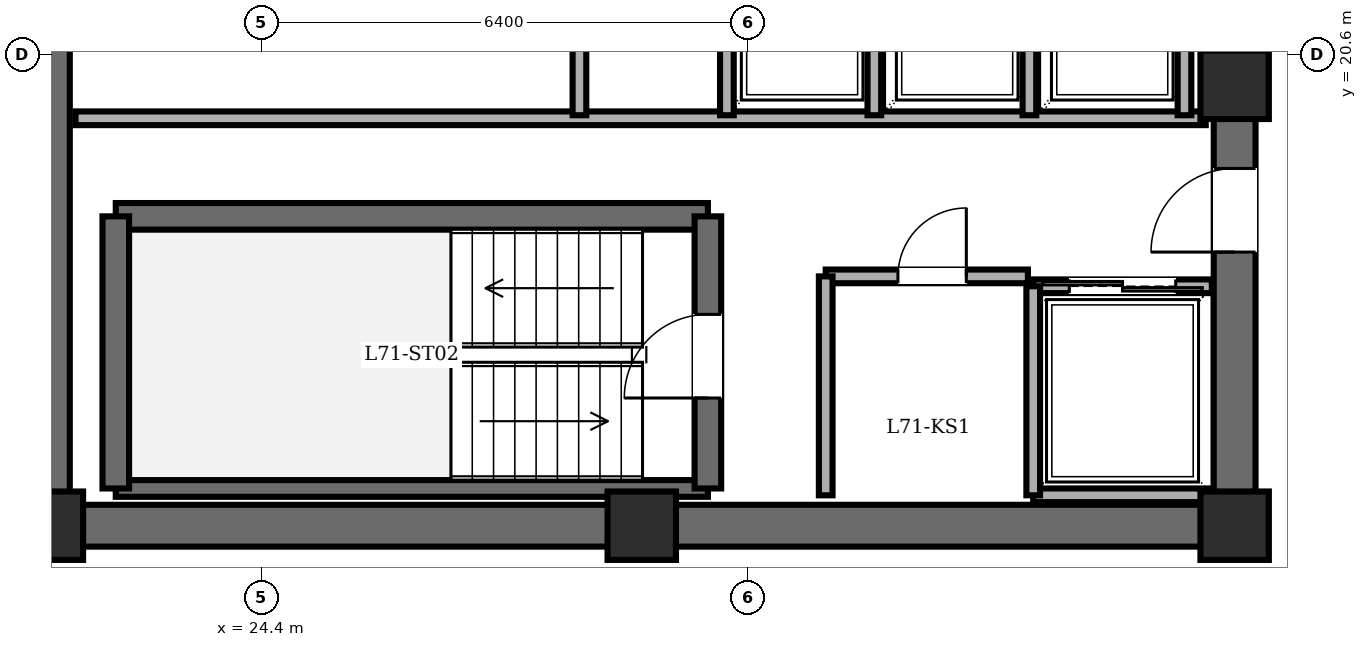
"""IFC4 building model, lengths in metres.
Left out: names, types, materials, properties, quantities, classifications, styles, units other than length and angle.
Written with IfcOpenShell. Run it as: python <this file> out.ifc"""

import sys

from ifc_helpers import new_model, si_unit, direction, frame, frame_2d, origin, origin_2d, place, context, subcontext, project, spatial, rectangle, extrude, element, fill, save


model = new_model("IFC4")
c1 = context("Model", 3, precision=1e-05, world=origin(), true_north=direction((0.0, 1.0)))
c2 = subcontext(c1, "Body", "Model", "MODEL_VIEW")
j1 = project(units=[si_unit("LENGTHUNIT", "METRE"), si_unit("PLANEANGLEUNIT", "RADIAN")], contexts=[c1])
p1 = place(None, origin())
s1 = spatial("IfcSite", under=j1, at=p1, CompositionType="ELEMENT")
p2 = place(p1, origin())
s2 = spatial("IfcBuilding", under=s1, at=p2, CompositionType="ELEMENT")
p3 = place(p2, frame((0.0, 0.0, 273.4)))
s3 = spatial("IfcBuildingStorey", under=s2, at=p3, CompositionType="ELEMENT", Elevation=273.4)
for number, where, z_axis, x_axis in (
    (1, (21.6, 14.4, 0.0), (0.0, 0.0, 1.0), (1.0, 0.0, 0.0)),
    (2, (29.4, 14.4, 0.0), (0.0, 0.0, 1.0), (1.0, 0.0, 0.0)),
    (3, (37.2, 14.4, 0.0), (0.0, 0.0, 1.0), (1.0, 0.0, 0.0)),
    (4, (37.2, 20.2, 0.0), (0.0, 0.0, 1.0), (1.0, 0.0, 0.0)),
):
    element("IfcColumn", number, at=place(p3, frame(where, z_axis=z_axis, x_axis=x_axis)), inside=s3, PredefinedType="COLUMN", context=c2, shape_type="SweptSolid", body=[
        extrude(rectangle(XDim=0.9, YDim=0.9, at=origin_2d()), origin(), (0.0, 0.0, 1.0), 3.65),
    ])
p4 = place(p3, frame((21.6, 14.4, 0.0), z_axis=(0.0, 0.0, 1.0), x_axis=(0.0, 1.0, 0.0)))
e5 = element("IfcWall", 5, at=p4, inside=s3, PredefinedType="SHEAR", context=c2, shape_type="SweptSolid", body=[
    extrude(rectangle(XDim=19.2, YDim=0.55, at=frame_2d((9.6, 0.0))), origin(), (0.0, 0.0, 1.0), 3.45),
])
p5 = place(p3, frame((37.2, 14.4, 0.0), z_axis=(0.0, 0.0, 1.0), x_axis=(-1.0, 0.0, 0.0)))
e6 = element("IfcWall", 6, at=p5, inside=s3, PredefinedType="SHEAR", context=c2, shape_type="SweptSolid", body=[
    extrude(rectangle(XDim=15.6, YDim=0.55, at=frame_2d((7.8, 0.0))), origin(), (0.0, 0.0, 1.0), 3.45),
])
p6 = place(p3, frame((37.2, 14.4, 0.0), z_axis=(0.0, 0.0, 1.0), x_axis=(0.0, 1.0, 0.0)))
e7 = element("IfcWall", 7, at=p6, inside=s3, PredefinedType="SHEAR", context=c2, shape_type="SweptSolid", body=[
    extrude(rectangle(XDim=19.2, YDim=0.55, at=frame_2d((9.6, 0.0))), origin(), (0.0, 0.0, 1.0), 3.45),
])
p7 = place(p6, frame((15.8, 0.0, 0.0)))
e8 = element("IfcOpeningElement", 8, at=p7, cuts=e7, PredefinedType="OPENING", context=c2, shape_type="SweptSolid", body=[
    extrude(rectangle(XDim=1.15, YDim=2.15, at=frame_2d((0.575, 1.075))), frame((0.0, 0.285, 0.0), z_axis=(0.0, -1.0, 0.0), x_axis=(1.0, 0.0, 0.0)), (0.0, 0.0, 1.0), 0.57),
])
p8 = place(p6, frame((3.6, 0.0, 0.0)))
e9 = element("IfcOpeningElement", 9, at=p8, cuts=e7, PredefinedType="OPENING", context=c2, shape_type="SweptSolid", body=[
    extrude(rectangle(XDim=1.1, YDim=2.15, at=frame_2d((0.55, 1.075))), frame((0.0, 0.285, 0.0), z_axis=(0.0, -1.0, 0.0), x_axis=(1.0, 0.0, 0.0)), (0.0, 0.0, 1.0), 0.57),
])
p9 = place(p6, frame((8.6, 0.0, 0.0)))
e10 = element("IfcOpeningElement", 10, at=p9, cuts=e7, PredefinedType="OPENING", context=c2, shape_type="SweptSolid", body=[
    extrude(rectangle(XDim=1.3, YDim=2.2, at=frame_2d((0.65, 1.1))), frame((0.0, 0.285, 0.0), z_axis=(0.0, -1.0, 0.0), x_axis=(1.0, 0.0, 0.0)), (0.0, 0.0, 1.0), 0.57),
])
p10 = place(p3, frame((22.48, 18.47, 0.0), z_axis=(0.0, 0.0, 1.0), x_axis=(1.0, 0.0, 0.0)))
e11 = element("IfcWall", 11, at=p10, inside=s3, PredefinedType="SOLIDWALL", context=c2, shape_type="SweptSolid", body=[
    extrude(rectangle(XDim=7.79, YDim=0.35, at=frame_2d((3.895, 0.0))), origin(), (0.0, 0.0, 1.0), 3.45),
])
p11 = place(p3, frame((22.48, 14.89, 0.0), z_axis=(0.0, 0.0, 1.0), x_axis=(1.0, 0.0, 0.0)))
e12 = element("IfcWall", 12, at=p11, inside=s3, PredefinedType="PARTITIONING", context=c2, shape_type="SweptSolid", body=[
    extrude(rectangle(XDim=7.79, YDim=0.22, at=frame_2d((3.895, 0.0))), origin(), (0.0, 0.0, 1.0), 3.45),
])
p12 = place(p3, frame((22.48, 14.89, 0.0), z_axis=(0.0, 0.0, 1.0), x_axis=(0.0, 1.0, 0.0)))
e13 = element("IfcWall", 13, at=p12, inside=s3, PredefinedType="SOLIDWALL", context=c2, shape_type="SweptSolid", body=[
    extrude(rectangle(XDim=3.58, YDim=0.35, at=frame_2d((1.79, 0.0))), origin(), (0.0, 0.0, 1.0), 3.45),
])
p13 = place(p3, frame((30.27, 14.89, 0.0), z_axis=(0.0, 0.0, 1.0), x_axis=(0.0, 1.0, 0.0)))
e14 = element("IfcWall", 14, at=p13, inside=s3, PredefinedType="SOLIDWALL", context=c2, shape_type="SweptSolid", body=[
    extrude(rectangle(XDim=3.58, YDim=0.35, at=frame_2d((1.79, 0.0))), origin(), (0.0, 0.0, 1.0), 3.45),
])
p14 = place(p13, frame((1.19, 0.0, 0.0)))
e15 = element("IfcOpeningElement", 15, at=p14, cuts=e14, PredefinedType="OPENING", context=c2, shape_type="SweptSolid", body=[
    extrude(rectangle(XDim=1.1, YDim=2.15, at=frame_2d((0.55, 1.075))), frame((0.0, 0.185, 0.0), z_axis=(0.0, -1.0, 0.0), x_axis=(1.0, 0.0, 0.0)), (0.0, 0.0, 1.0), 0.37),
])
p15 = place(p3, frame((21.95, 19.76, 0.0), z_axis=(0.0, 0.0, 1.0), x_axis=(1.0, 0.0, 0.0)))
e16 = element("IfcWall", 16, at=p15, inside=s3, PredefinedType="PARTITIONING", context=c2, shape_type="SweptSolid", body=[
    extrude(rectangle(XDim=14.87, YDim=0.18, at=frame_2d((7.435, 0.0))), origin(), (0.0, 0.0, 1.0), 3.45),
])
p16 = place(p3, frame((31.82, 17.68, 0.0), z_axis=(0.0, 0.0, 1.0), x_axis=(1.0, 0.0, 0.0)))
e17 = element("IfcWall", 17, at=p16, inside=s3, PredefinedType="PARTITIONING", context=c2, shape_type="SweptSolid", body=[
    extrude(rectangle(XDim=2.66, YDim=0.18, at=frame_2d((1.33, 0.0))), origin(), (0.0, 0.0, 1.0), 3.45),
])
p17 = place(p16, frame((0.95, 0.0, 0.0)))
e18 = element("IfcOpeningElement", 18, at=p17, cuts=e17, PredefinedType="OPENING", context=c2, shape_type="SweptSolid", body=[
    extrude(rectangle(XDim=0.9, YDim=2.05, at=frame_2d((0.45, 1.025))), frame((0.0, 0.1, 0.0), z_axis=(0.0, -1.0, 0.0), x_axis=(1.0, 0.0, 0.0)), (0.0, 0.0, 1.0), 0.2),
])
p18 = place(p3, frame((31.82, 14.8, 0.0), z_axis=(0.0, 0.0, 1.0), x_axis=(0.0, 1.0, 0.0)))
e19 = element("IfcWall", 19, at=p18, inside=s3, PredefinedType="PARTITIONING", context=c2, shape_type="SweptSolid", body=[
    extrude(rectangle(XDim=2.88, YDim=0.18, at=frame_2d((1.44, 0.0))), origin(), (0.0, 0.0, 1.0), 3.45),
])
p19 = place(p3, frame((34.55, 17.55, 0.0), z_axis=(0.0, 0.0, 1.0), x_axis=(1.0, 0.0, 0.0)))
e20 = element("IfcWall", 20, at=p19, inside=s3, PredefinedType="PARTITIONING", context=c2, shape_type="SweptSolid", body=[
    extrude(rectangle(XDim=2.35, YDim=0.18, at=frame_2d((1.175, 0.0))), origin(), (0.0, 0.0, 1.0), 3.45),
])
p20 = place(p19, frame((0.475, 0.0, 0.0)))
e21 = element("IfcOpeningElement", 21, at=p20, cuts=e20, PredefinedType="OPENING", context=c2, shape_type="SweptSolid", body=[
    extrude(rectangle(XDim=1.4, YDim=2.3, at=frame_2d((0.7, 1.15))), frame((0.0, 0.1, 0.0), z_axis=(0.0, -1.0, 0.0), x_axis=(1.0, 0.0, 0.0)), (0.0, 0.0, 1.0), 0.2),
])
p21 = place(p3, frame((36.9, 14.8, 0.0), z_axis=(0.0, 0.0, 1.0), x_axis=(-1.0, 0.0, 0.0)))
e22 = element("IfcWall", 22, at=p21, inside=s3, PredefinedType="PARTITIONING", context=c2, shape_type="SweptSolid", body=[
    extrude(rectangle(XDim=2.35, YDim=0.18, at=frame_2d((1.175, 0.0))), origin(), (0.0, 0.0, 1.0), 3.45),
])
p22 = place(p3, frame((34.55, 17.55, 0.0), z_axis=(0.0, 0.0, 1.0), x_axis=(0.0, -1.0, 0.0)))
e23 = element("IfcWall", 23, at=p22, inside=s3, PredefinedType="PARTITIONING", context=c2, shape_type="SweptSolid", body=[
    extrude(rectangle(XDim=2.75, YDim=0.18, at=frame_2d((1.375, 0.0))), origin(), (0.0, 0.0, 1.0), 3.45),
])
for number, where, z_axis, x_axis in (
    (24, (32.46, 19.8, 0.0), (0.0, 0.0, 1.0), (0.0, 1.0, 0.0)),
    (25, (34.5, 19.8, 0.0), (0.0, 0.0, 1.0), (0.0, 1.0, 0.0)),
    (26, (36.54, 19.8, 0.0), (0.0, 0.0, 1.0), (0.0, 1.0, 0.0)),
):
    element("IfcWall", number, at=place(p3, frame(where, z_axis=z_axis, x_axis=x_axis)), inside=s3, PredefinedType="PARTITIONING", context=c2, shape_type="SweptSolid", body=[
        extrude(rectangle(XDim=2.5, YDim=0.18, at=frame_2d((1.25, 0.0))), origin(), (0.0, 0.0, 1.0), 3.45),
    ])
p23 = place(p3, frame((30.52, 19.8, 0.0), z_axis=(0.0, 0.0, 1.0), x_axis=(0.0, 1.0, 0.0)))
e27 = element("IfcWall", 27, at=p23, inside=s3, PredefinedType="PARTITIONING", context=c2, shape_type="SweptSolid", body=[
    extrude(rectangle(XDim=2.55, YDim=0.18, at=frame_2d((1.275, 0.0))), origin(), (0.0, 0.0, 1.0), 3.45),
])
p24 = place(p3, frame((28.58, 19.8, 0.0), z_axis=(0.0, 0.0, 1.0), x_axis=(0.0, 1.0, 0.0)))
e28 = element("IfcWall", 28, at=p24, inside=s3, PredefinedType="PARTITIONING", context=c2, shape_type="SweptSolid", body=[
    extrude(rectangle(XDim=3.85, YDim=0.18, at=frame_2d((1.925, 0.0))), origin(), (0.0, 0.0, 1.0), 3.45),
])
p25 = place(p24, frame((1.465, 0.0, 0.0)))
e29 = element("IfcOpeningElement", 29, at=p25, cuts=e28, PredefinedType="OPENING", context=c2, shape_type="SweptSolid", body=[
    extrude(rectangle(XDim=0.92, YDim=2.1, at=frame_2d((0.46, 1.05))), frame((0.0, 0.1, 0.0), z_axis=(0.0, -1.0, 0.0), x_axis=(1.0, 0.0, 0.0)), (0.0, 0.0, 1.0), 0.2),
])
p26 = place(p14, origin())
e30 = element("IfcDoor", 30, at=p26, inside=s3, OperationType="SINGLE_SWING_LEFT", PredefinedType="DOOR", context=c2, shape_type="SweptSolid", body=[
    extrude(rectangle(XDim=1.1, YDim=2.15, at=frame_2d((0.55, 1.075))), frame((0.0, 0.025, 0.0), z_axis=(0.0, -1.0, 0.0), x_axis=(1.0, 0.0, 0.0)), (0.0, 0.0, 1.0), 0.05),
])
fill(e15, e30)
p27 = place(p8, origin())
e31 = element("IfcDoor", 31, at=p27, inside=s3, OperationType="SINGLE_SWING_LEFT", PredefinedType="DOOR", context=c2, shape_type="SweptSolid", body=[
    extrude(rectangle(XDim=1.1, YDim=2.15, at=frame_2d((0.55, 1.075))), frame((0.0, 0.025, 0.0), z_axis=(0.0, -1.0, 0.0), x_axis=(1.0, 0.0, 0.0)), (0.0, 0.0, 1.0), 0.05),
])
fill(e9, e31)
p28 = place(p17, origin())
e32 = element("IfcDoor", 32, at=p28, inside=s3, OperationType="SINGLE_SWING_RIGHT", PredefinedType="DOOR", context=c2, shape_type="SweptSolid", body=[
    extrude(rectangle(XDim=0.9, YDim=2.05, at=frame_2d((0.45, 1.025))), frame((0.0, 0.025, 0.0), z_axis=(0.0, -1.0, 0.0), x_axis=(1.0, 0.0, 0.0)), (0.0, 0.0, 1.0), 0.05),
])
fill(e18, e32)
p29 = place(p20, origin())
e33 = element("IfcDoor", 33, at=p29, inside=s3, OperationType="DOUBLE_DOOR_SLIDING", PredefinedType="DOOR", context=c2, shape_type="SweptSolid", body=[
    extrude(rectangle(XDim=1.4, YDim=2.3, at=frame_2d((0.7, 1.15))), frame((0.0, 0.025, 0.0), z_axis=(0.0, -1.0, 0.0), x_axis=(1.0, 0.0, 0.0)), (0.0, 0.0, 1.0), 0.05),
])
fill(e21, e33)
save(model, sys.argv[1])
